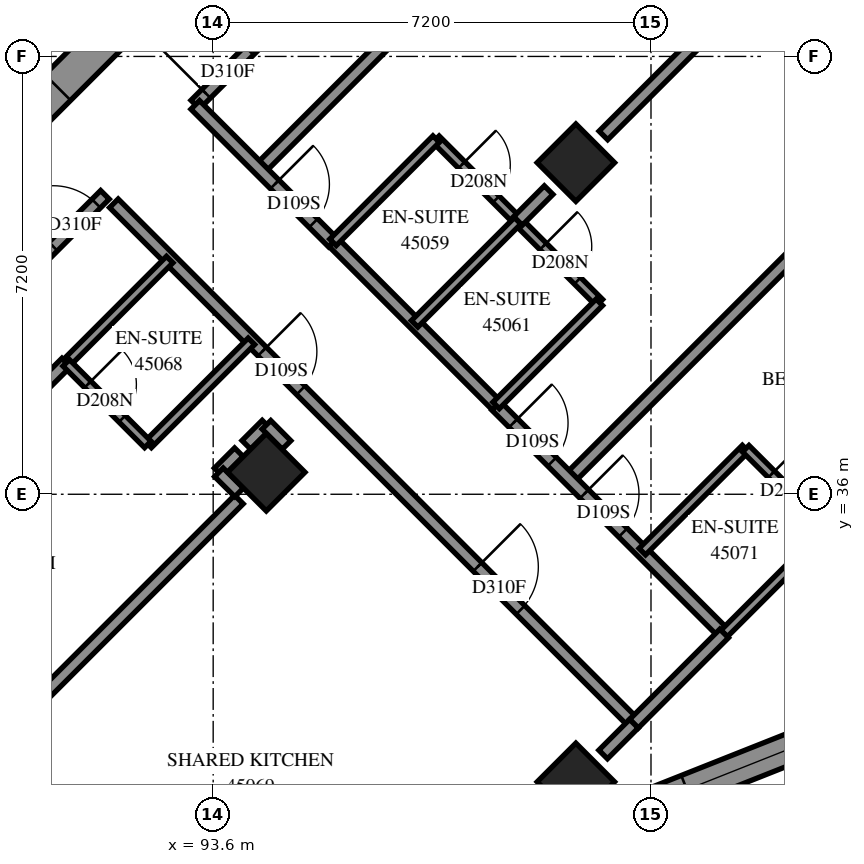
"""IFC4 building model, lengths in metres.
Left out: names, types, materials, properties, quantities, classifications, styles, units other than length and angle.
Written with IfcOpenShell. Run it as: python <this file> out.ifc"""

import sys

from ifc_helpers import new_model, si_unit, direction, frame, frame_2d, origin, origin_2d, place, context, subcontext, project, spatial, polyline, rectangle, outline, extrude, element, fill, save


model = new_model("IFC4")
c1 = context("Model", 3, precision=1e-05, world=origin(), true_north=direction((0.0, 1.0)))
c2 = subcontext(c1, "Body", "Model", "MODEL_VIEW")
j1 = project(units=[si_unit("LENGTHUNIT", "METRE"), si_unit("PLANEANGLEUNIT", "RADIAN")], contexts=[c1])
p1 = place(None, origin())
s1 = spatial("IfcSite", under=j1, at=p1, CompositionType="ELEMENT")
p2 = place(p1, origin())
s2 = spatial("IfcBuilding", under=s1, at=p2, CompositionType="ELEMENT")
p3 = place(p2, frame((0.0, 0.0, 166.0)))
s3 = spatial("IfcBuildingStorey", under=s2, at=p3, CompositionType="ELEMENT", Elevation=166.0)
for number, where, z_axis, x_axis in (
    (1, (99.565, 41.453, 0.0), (0.0, 0.0, 1.0), (0.707, -0.707, 0.0)),
    (2, (94.474, 36.362, 0.0), (0.0, 0.0, 1.0), (0.707, -0.707, 0.0)),
    (3, (99.565, 31.271, 0.0), (0.0, 0.0, 1.0), (0.707, -0.707, 0.0)),
):
    element("IfcColumn", number, at=place(p3, frame(where, z_axis=z_axis, x_axis=x_axis)), inside=s3, PredefinedType="COLUMN", context=c2, shape_type="SweptSolid", body=[
        extrude(rectangle(XDim=0.9, YDim=0.9, at=origin_2d()), origin(), (0.0, 0.0, 1.0), 3.1),
    ])
p4 = place(p3, frame((87.049, 38.695, -0.3), z_axis=(0.0, 0.0, 1.0), x_axis=(0.7071067812, 0.7071067812, 0.0)))
e4 = element("IfcWall", 4, at=p4, inside=s3, PredefinedType="SHEAR", context=c2, shape_type="SweptSolid", body=[
    extrude(rectangle(XDim=14.4, YDim=0.6, at=frame_2d((7.2, 0.0))), origin(), (0.0, 0.0, 1.0), 2.7),
])
p5 = place(p4, frame((4.55, 0.0, 0.3)))
e5 = element("IfcOpeningElement", 5, at=p5, cuts=e4, PredefinedType="OPENING", context=c2, shape_type="SweptSolid", body=[
    extrude(rectangle(XDim=1.1, YDim=2.1, at=frame_2d((0.55, 1.05))), frame((0.0, 0.31, 0.0), z_axis=(0.0, -1.0, 0.0), x_axis=(1.0, 0.0, 0.0)), (0.0, 0.0, 1.0), 0.62),
])
p6 = place(p4, frame((11.35, 0.0, 0.3)))
e6 = element("IfcOpeningElement", 6, at=p6, cuts=e4, PredefinedType="OPENING", context=c2, shape_type="SweptSolid", body=[
    extrude(rectangle(XDim=1.1, YDim=2.1, at=frame_2d((0.55, 1.05))), frame((0.0, 0.31, 0.0), z_axis=(0.0, -1.0, 0.0), x_axis=(1.0, 0.0, 0.0)), (0.0, 0.0, 1.0), 0.62),
])
p7 = place(p3, frame((100.796, 30.907, 0.0), z_axis=(0.0, 0.0, 1.0), x_axis=(0.9295366495, 0.3687297347, 0.0)))
e7 = element("IfcWall", 7, at=p7, inside=s3, PredefinedType="SOLIDWALL", context=c2, shape_type="SweptSolid", body=[
    extrude(outline(polyline([(0.108, -0.25), (5.656, -0.25), (5.43, 0.25), (-0.108, 0.25), (0.108, -0.25)])), origin(), (0.0, 0.0, 1.0), 3.1),
])
p8 = place(p7, frame((0.638, 0.0, 0.45)))
e8 = element("IfcOpeningElement", 8, at=p8, cuts=e7, PredefinedType="OPENING", context=c2, shape_type="SweptSolid", body=[
    extrude(rectangle(XDim=2.8, YDim=2.5, at=frame_2d((1.4, 1.25))), frame((0.0, 0.26, 0.0), z_axis=(0.0, -1.0, 0.0), x_axis=(1.0, 0.0, 0.0)), (0.0, 0.0, 1.0), 0.52),
])
p9 = place(p3, frame((91.967, 40.785, 0.0), z_axis=(0.0, 0.0, 1.0), x_axis=(0.7071067812, -0.7071067812, 0.0)))
e9 = element("IfcWall", 9, at=p9, inside=s3, PredefinedType="PARTITIONING", context=c2, shape_type="SweptSolid", body=[
    extrude(rectangle(XDim=12.1, YDim=0.2, at=frame_2d((6.05, 0.0))), origin(), (0.0, 0.0, 1.0), 3.1),
])
p10 = place(p9, frame((3.448, 0.0, 0.0)))
e10 = element("IfcOpeningElement", 10, at=p10, cuts=e9, PredefinedType="OPENING", context=c2, shape_type="SweptSolid", body=[
    extrude(rectangle(XDim=0.9, YDim=2.1, at=frame_2d((0.45, 1.05))), frame((0.0, 0.11, 0.0), z_axis=(0.0, -1.0, 0.0), x_axis=(1.0, 0.0, 0.0)), (0.0, 0.0, 1.0), 0.22),
])
p11 = place(p9, frame((8.457, 0.0, 0.0)))
e11 = element("IfcOpeningElement", 11, at=p11, cuts=e9, PredefinedType="OPENING", context=c2, shape_type="SweptSolid", body=[
    extrude(rectangle(XDim=1.0, YDim=2.1, at=frame_2d((0.5, 1.05))), frame((0.0, 0.11, 0.0), z_axis=(0.0, -1.0, 0.0), x_axis=(1.0, 0.0, 0.0)), (0.0, 0.0, 1.0), 0.22),
])
p12 = place(p3, frame((94.366, 41.348, 0.0), z_axis=(0.0, 0.0, 1.0), x_axis=(0.7071108994, 0.707102663, 0.0)))
e12 = element("IfcWall", 12, at=p12, inside=s3, PredefinedType="PARTITIONING", context=c2, shape_type="SweptSolid", body=[
    extrude(rectangle(XDim=12.141, YDim=0.2, at=frame_2d((6.071, 0.0))), origin(), (0.0, 0.0, 1.0), 3.1),
])
p13 = place(p3, frame((93.306, 42.408, 0.0), z_axis=(0.0, 0.0, 1.0), x_axis=(0.7071067812, 0.7071067812, 0.0)))
e13 = element("IfcWall", 13, at=p13, inside=s3, PredefinedType="PARTITIONING", context=c2, shape_type="SweptSolid", body=[
    extrude(rectangle(XDim=9.45, YDim=0.2, at=frame_2d((4.725, 0.0))), origin(), (0.0, 0.0, 1.0), 3.1),
])
p14 = place(p13, frame((0.253, 0.0, 0.0)))
e14 = element("IfcOpeningElement", 14, at=p14, cuts=e13, PredefinedType="OPENING", context=c2, shape_type="SweptSolid", body=[
    extrude(rectangle(XDim=1.0, YDim=2.1, at=frame_2d((0.5, 1.05))), frame((0.0, 0.11, 0.0), z_axis=(0.0, -1.0, 0.0), x_axis=(1.0, 0.0, 0.0)), (0.0, 0.0, 1.0), 0.22),
])
p15 = place(p3, frame((86.834, 35.94, 0.0), z_axis=(0.0, 0.0, 1.0), x_axis=(0.7072486139, 0.7069649201, 0.0)))
e15 = element("IfcWall", 15, at=p15, inside=s3, PredefinedType="PARTITIONING", context=c2, shape_type="SweptSolid", body=[
    extrude(rectangle(XDim=7.05, YDim=0.2, at=frame_2d((3.525, 0.0))), origin(), (0.0, 0.0, 1.0), 3.1),
])
p16 = place(p15, frame((5.848, 0.0, 0.0)))
e16 = element("IfcOpeningElement", 16, at=p16, cuts=e15, PredefinedType="OPENING", context=c2, shape_type="SweptSolid", body=[
    extrude(rectangle(XDim=1.0, YDim=2.1, at=frame_2d((0.5, 1.05))), frame((0.0, 0.11, 0.0), z_axis=(0.0, -1.0, 0.0), x_axis=(1.0, 0.0, 0.0)), (0.0, 0.0, 1.0), 0.22),
])
p17 = place(p3, frame((86.329, 33.313, 0.0), z_axis=(0.0, 0.0, 1.0), x_axis=(0.7072524412, 0.7069610911, 0.0)))
e17 = element("IfcWall", 17, at=p17, inside=s3, PredefinedType="PARTITIONING", context=c2, shape_type="SweptSolid", body=[
    extrude(rectangle(XDim=6.865, YDim=0.2, at=frame_2d((3.432, 0.0))), origin(), (0.0, 0.0, 1.0), 3.1),
])
p18 = place(p3, frame((99.458, 36.256, 0.0), z_axis=(0.0, 0.0, 1.0), x_axis=(0.7071067812, 0.7071067812, 0.0)))
e18 = element("IfcWall", 18, at=p18, inside=s3, PredefinedType="PARTITIONING", context=c2, shape_type="SweptSolid", body=[
    extrude(rectangle(XDim=6.85, YDim=0.2, at=frame_2d((3.425, 0.0))), origin(), (0.0, 0.0, 1.0), 3.1),
])
p19 = place(p3, frame((89.831, 31.721, 0.0), z_axis=(0.0, 0.0, 1.0), x_axis=(0.7071067812, 0.7071067812, 0.0)))
e19 = element("IfcWall", 19, at=p19, inside=s3, PredefinedType="PARTITIONING", context=c2, shape_type="SweptSolid", body=[
    extrude(rectangle(XDim=5.928, YDim=0.2, at=frame_2d((2.964, 0.0))), origin(), (0.0, 0.0, 1.0), 3.1),
])
p20 = place(p3, frame((100.017, 41.901, 0.0), z_axis=(0.0, 0.0, 1.0), x_axis=(0.7072754814, 0.7069380408, 0.0)))
e20 = element("IfcWall", 20, at=p20, inside=s3, PredefinedType="PARTITIONING", context=c2, shape_type="SweptSolid", body=[
    extrude(rectangle(XDim=5.927, YDim=0.2, at=frame_2d((2.963, 0.0))), origin(), (0.0, 0.0, 1.0), 3.1),
])
p21 = place(p3, frame((98.253, 37.455, 0.0), z_axis=(0.0, 0.0, 1.0), x_axis=(0.7071067812, -0.7071067812, 0.0)))
e21 = element("IfcWall", 21, at=p21, inside=s3, PredefinedType="PARTITIONING", context=c2, shape_type="SweptSolid", body=[
    extrude(rectangle(XDim=5.301, YDim=0.2, at=frame_2d((2.65, 0.0))), origin(), (0.0, 0.0, 1.0), 3.1),
])
p22 = place(p21, frame((0.401, 0.0, 0.0)))
e22 = element("IfcOpeningElement", 22, at=p22, cuts=e21, PredefinedType="OPENING", context=c2, shape_type="SweptSolid", body=[
    extrude(rectangle(XDim=0.9, YDim=2.1, at=frame_2d((0.45, 1.05))), frame((0.0, 0.11, 0.0), z_axis=(0.0, -1.0, 0.0), x_axis=(1.0, 0.0, 0.0)), (0.0, 0.0, 1.0), 0.22),
])
p23 = place(p21, frame((2.05, 0.0, 0.0)))
e23 = element("IfcOpeningElement", 23, at=p23, cuts=e21, PredefinedType="OPENING", context=c2, shape_type="SweptSolid", body=[
    extrude(rectangle(XDim=0.9, YDim=2.1, at=frame_2d((0.45, 1.05))), frame((0.0, 0.11, 0.0), z_axis=(0.0, -1.0, 0.0), x_axis=(1.0, 0.0, 0.0)), (0.0, 0.0, 1.0), 0.22),
])
p24 = place(p3, frame((97.263, 41.839, 0.0), z_axis=(0.0, 0.0, 1.0), x_axis=(0.7071067812, -0.7071067812, 0.0)))
e24 = element("IfcWall", 24, at=p24, inside=s3, PredefinedType="PARTITIONING", context=c2, shape_type="SweptSolid", body=[
    extrude(rectangle(XDim=3.801, YDim=0.15, at=frame_2d((1.901, 0.0))), origin(), (0.0, 0.0, 1.0), 3.1),
])
p25 = place(p24, frame((0.598, 0.0, 0.0)))
e25 = element("IfcOpeningElement", 25, at=p25, cuts=e24, PredefinedType="OPENING", context=c2, shape_type="SweptSolid", body=[
    extrude(rectangle(XDim=0.8, YDim=2.1, at=frame_2d((0.4, 1.05))), frame((0.0, 0.085, 0.0), z_axis=(0.0, -1.0, 0.0), x_axis=(1.0, 0.0, 0.0)), (0.0, 0.0, 1.0), 0.17),
])
p26 = place(p24, frame((2.493, 0.0, 0.0)))
e26 = element("IfcOpeningElement", 26, at=p26, cuts=e24, PredefinedType="OPENING", context=c2, shape_type="SweptSolid", body=[
    extrude(rectangle(XDim=0.8, YDim=2.1, at=frame_2d((0.4, 1.05))), frame((0.0, 0.085, 0.0), z_axis=(0.0, -1.0, 0.0), x_axis=(1.0, 0.0, 0.0)), (0.0, 0.0, 1.0), 0.17),
])
p27 = place(p3, frame((95.573, 40.148, 0.0), z_axis=(0.0, 0.0, 1.0), x_axis=(0.7068698107, -0.7073436723, 0.0)))
e27 = element("IfcWall", 27, at=p27, inside=s3, PredefinedType="PARTITIONING", context=c2, shape_type="SweptSolid", body=[
    extrude(rectangle(XDim=3.799, YDim=0.2, at=frame_2d((1.899, 0.0))), origin(), (0.0, 0.0, 1.0), 3.1),
])
p28 = place(p3, frame((93.305, 42.403, 0.0), z_axis=(0.0, 0.0, 1.0), x_axis=(0.7071067812, -0.7071067812, 0.0)))
e28 = element("IfcWall", 28, at=p28, inside=s3, PredefinedType="PARTITIONING", context=c2, shape_type="SweptSolid", body=[
    extrude(rectangle(XDim=3.199, YDim=0.2, at=frame_2d((1.599, 0.0))), origin(), (0.0, 0.0, 1.0), 3.1),
])
p29 = place(p28, frame((1.848, 0.0, 0.0)))
e29 = element("IfcOpeningElement", 29, at=p29, cuts=e28, PredefinedType="OPENING", context=c2, shape_type="SweptSolid", body=[
    extrude(rectangle(XDim=0.9, YDim=2.1, at=frame_2d((0.45, 1.05))), frame((0.0, 0.11, 0.0), z_axis=(0.0, -1.0, 0.0), x_axis=(1.0, 0.0, 0.0)), (0.0, 0.0, 1.0), 0.22),
])
p30 = place(p3, frame((102.003, 33.711, 0.0), z_axis=(0.0, 0.0, 1.0), x_axis=(0.7071067812, 0.7071067812, 0.0)))
e30 = element("IfcWall", 30, at=p30, inside=s3, PredefinedType="PARTITIONING", context=c2, shape_type="SweptSolid", body=[
    extrude(rectangle(XDim=2.401, YDim=0.15, at=frame_2d((1.201, 0.0))), origin(), (0.0, 0.0, 1.0), 2.6),
])
for number, where, z_axis, x_axis in (
    (31, (95.571, 40.143, 0.0), (0.0, 0.0, 1.0), (0.707, 0.708, 0.0)),
    (32, (98.253, 37.461, 0.0), (0.0, 0.0, 1.0), (0.708, 0.707, 0.0)),
    (33, (100.657, 35.057, 0.0), (0.0, 0.0, 1.0), (0.708, 0.707, 0.0)),
    (34, (91.189, 38.161, 0.0), (0.0, 0.0, 1.0), (0.707, 0.708, 0.0)),
    (35, (92.531, 36.819, 0.0), (0.0, 0.0, 1.0), (0.708, 0.707, 0.0)),
):
    element("IfcWall", number, at=place(p3, frame(where, z_axis=z_axis, x_axis=x_axis)), inside=s3, PredefinedType="PARTITIONING", context=c2, shape_type="SweptSolid", body=[
        extrude(rectangle(XDim=2.4, YDim=0.15, at=frame_2d((1.2, 0.0))), origin(), (0.0, 0.0, 1.0), 3.1),
    ])
p31 = place(p3, frame((96.913, 38.803, 0.0), z_axis=(0.0, 0.0, 1.0), x_axis=(0.7071067812, 0.7071067812, 0.0)))
e36 = element("IfcWall", 36, at=p31, inside=s3, PredefinedType="PARTITIONING", context=c2, shape_type="SweptSolid", body=[
    extrude(rectangle(XDim=2.398, YDim=0.15, at=frame_2d((1.199, 0.0))), origin(), (0.0, 0.0, 1.0), 3.1),
])
p32 = place(p3, frame((100.519, 32.227, 0.0), z_axis=(0.0, 0.0, 1.0), x_axis=(0.7071067812, 0.7071067812, 0.0)))
e37 = element("IfcWall", 37, at=p32, inside=s3, PredefinedType="PARTITIONING", context=c2, shape_type="SweptSolid", body=[
    extrude(rectangle(XDim=2.099, YDim=0.2, at=frame_2d((1.049, 0.0))), origin(), (0.0, 0.0, 1.0), 2.6),
])
p33 = place(p3, frame((102.358, 36.75, 0.0), z_axis=(0.0, 0.0, 1.0), x_axis=(0.7076330979, -0.7065800724, 0.0)))
e38 = element("IfcWall", 38, at=p33, inside=s3, PredefinedType="PARTITIONING", context=c2, shape_type="SweptSolid", body=[
    extrude(rectangle(XDim=1.899, YDim=0.15, at=frame_2d((0.95, 0.0))), origin(), (0.0, 0.0, 1.0), 3.1),
])
p34 = place(p33, frame((0.597, 0.0, 0.0)))
e39 = element("IfcOpeningElement", 39, at=p34, cuts=e38, PredefinedType="OPENING", context=c2, shape_type="SweptSolid", body=[
    extrude(rectangle(XDim=0.8, YDim=2.1, at=frame_2d((0.4, 1.05))), frame((0.0, 0.085, 0.0), z_axis=(0.0, -1.0, 0.0), x_axis=(1.0, 0.0, 0.0)), (0.0, 0.0, 1.0), 0.17),
])
p35 = place(p3, frame((91.183, 38.161, 0.0), z_axis=(0.0, 0.0, 1.0), x_axis=(0.7071067812, -0.7071067812, 0.0)))
e40 = element("IfcWall", 40, at=p35, inside=s3, PredefinedType="PARTITIONING", context=c2, shape_type="SweptSolid", body=[
    extrude(rectangle(XDim=1.898, YDim=0.15, at=frame_2d((0.949, 0.0))), origin(), (0.0, 0.0, 1.0), 3.1),
])
p36 = place(p35, frame((0.501, 0.0, 0.0)))
e41 = element("IfcOpeningElement", 41, at=p36, cuts=e40, PredefinedType="OPENING", context=c2, shape_type="SweptSolid", body=[
    extrude(rectangle(XDim=0.8, YDim=2.1, at=frame_2d((0.4, 1.05))), frame((0.0, 0.085, 0.0), z_axis=(0.0, -1.0, 0.0), x_axis=(1.0, 0.0, 0.0)), (0.0, 0.0, 1.0), 0.17),
])
p37 = place(p3, frame((100.013, 31.721, 0.0), z_axis=(0.0, 0.0, 1.0), x_axis=(0.7071067812, 0.7071067812, 0.0)))
e42 = element("IfcWall", 42, at=p37, inside=s3, PredefinedType="PARTITIONING", context=c2, shape_type="SweptSolid", body=[
    extrude(rectangle(XDim=0.716, YDim=0.2, at=frame_2d((0.358, 0.0))), origin(), (0.0, 0.0, 1.0), 2.6),
])
p38 = place(p3, frame((98.613, 40.495, 0.0), z_axis=(0.0, 0.0, 1.0), x_axis=(0.7057051861, 0.7085056035, 0.0)))
e43 = element("IfcWall", 43, at=p38, inside=s3, PredefinedType="PARTITIONING", context=c2, shape_type="SweptSolid", body=[
    extrude(rectangle(XDim=0.714, YDim=0.2, at=frame_2d((0.357, 0.0))), origin(), (0.0, 0.0, 1.0), 3.1),
])
for number, where, z_axis, x_axis in (
    (44, (94.145, 36.813, 0.0), (0.0, 0.0, 1.0), (0.707, 0.707, 0.0)),
    (45, (93.691, 36.359, 0.0), (0.0, 0.0, 1.0), (0.707, 0.707, 0.0)),
):
    element("IfcWall", number, at=place(p3, frame(where, z_axis=z_axis, x_axis=x_axis)), inside=s3, PredefinedType="PARTITIONING", context=c2, shape_type="SweptSolid", body=[
        extrude(rectangle(XDim=0.469, YDim=0.2, at=frame_2d((0.235, 0.0))), origin(), (0.0, 0.0, 1.0), 3.1),
    ])
for number, where, z_axis, x_axis in (
    (46, (94.476, 37.142, 0.0), (0.0, 0.0, 1.0), (0.705, -0.709, 0.0)),
    (47, (93.695, 36.361, 0.0), (0.0, 0.0, 1.0), (0.709, -0.705, 0.0)),
):
    element("IfcWall", number, at=place(p3, frame(where, z_axis=z_axis, x_axis=x_axis)), inside=s3, PredefinedType="PARTITIONING", context=c2, shape_type="SweptSolid", body=[
        extrude(rectangle(XDim=0.468, YDim=0.2, at=frame_2d((0.234, 0.0))), origin(), (0.0, 0.0, 1.0), 3.1),
    ])
p39 = place(p8, origin())
e48 = element("IfcWindow", 48, at=p39, inside=s3, PartitioningType="SINGLE_PANEL", PredefinedType="WINDOW", context=c2, shape_type="SweptSolid", body=[
    extrude(rectangle(XDim=2.8, YDim=2.5, at=frame_2d((1.4, 1.25))), frame((0.0, 0.18, 0.0), z_axis=(0.0, -1.0, 0.0), x_axis=(1.0, 0.0, 0.0)), (0.0, 0.0, 1.0), 0.06),
])
fill(e8, e48)
p40 = place(p5, origin())
e49 = element("IfcDoor", 49, at=p40, inside=s3, OperationType="DOUBLE_DOOR_SINGLE_SWING", PredefinedType="DOOR", context=c2, shape_type="SweptSolid", body=[
    extrude(rectangle(XDim=1.1, YDim=2.1, at=frame_2d((0.55, 1.05))), frame((0.0, 0.025, 0.0), z_axis=(0.0, -1.0, 0.0), x_axis=(1.0, 0.0, 0.0)), (0.0, 0.0, 1.0), 0.05),
])
fill(e5, e49)
p41 = place(p14, origin())
e50 = element("IfcDoor", 50, at=p41, inside=s3, OperationType="SINGLE_SWING_RIGHT", PredefinedType="DOOR", context=c2, shape_type="SweptSolid", body=[
    extrude(rectangle(XDim=1.0, YDim=2.1, at=frame_2d((0.5, 1.05))), frame((0.0, 0.025, 0.0), z_axis=(0.0, -1.0, 0.0), x_axis=(1.0, 0.0, 0.0)), (0.0, 0.0, 1.0), 0.05),
])
fill(e14, e50)
p42 = place(p29, origin())
e51 = element("IfcDoor", 51, at=p42, inside=s3, OperationType="SINGLE_SWING_RIGHT", PredefinedType="DOOR", context=c2, shape_type="SweptSolid", body=[
    extrude(rectangle(XDim=0.9, YDim=2.1, at=frame_2d((0.45, 1.05))), frame((0.0, 0.025, 0.0), z_axis=(0.0, -1.0, 0.0), x_axis=(1.0, 0.0, 0.0)), (0.0, 0.0, 1.0), 0.05),
])
fill(e29, e51)
p43 = place(p25, origin())
e52 = element("IfcDoor", 52, at=p43, inside=s3, OperationType="SINGLE_SWING_RIGHT", PredefinedType="DOOR", context=c2, shape_type="SweptSolid", body=[
    extrude(rectangle(XDim=0.8, YDim=2.1, at=frame_2d((0.4, 1.05))), frame((0.0, 0.025, 0.0), z_axis=(0.0, -1.0, 0.0), x_axis=(1.0, 0.0, 0.0)), (0.0, 0.0, 1.0), 0.05),
])
fill(e25, e52)
p44 = place(p22, origin())
e53 = element("IfcDoor", 53, at=p44, inside=s3, OperationType="SINGLE_SWING_LEFT", PredefinedType="DOOR", context=c2, shape_type="SweptSolid", body=[
    extrude(rectangle(XDim=0.9, YDim=2.1, at=frame_2d((0.45, 1.05))), frame((0.0, 0.025, 0.0), z_axis=(0.0, -1.0, 0.0), x_axis=(1.0, 0.0, 0.0)), (0.0, 0.0, 1.0), 0.05),
])
fill(e22, e53)
p45 = place(p26, origin())
e54 = element("IfcDoor", 54, at=p45, inside=s3, OperationType="SINGLE_SWING_RIGHT", PredefinedType="DOOR", context=c2, shape_type="SweptSolid", body=[
    extrude(rectangle(XDim=0.8, YDim=2.1, at=frame_2d((0.4, 1.05))), frame((0.0, 0.025, 0.0), z_axis=(0.0, -1.0, 0.0), x_axis=(1.0, 0.0, 0.0)), (0.0, 0.0, 1.0), 0.05),
])
fill(e26, e54)
p46 = place(p16, origin())
e55 = element("IfcDoor", 55, at=p46, inside=s3, OperationType="SINGLE_SWING_RIGHT", PredefinedType="DOOR", context=c2, shape_type="SweptSolid", body=[
    extrude(rectangle(XDim=1.0, YDim=2.1, at=frame_2d((0.5, 1.05))), frame((0.0, 0.025, 0.0), z_axis=(0.0, -1.0, 0.0), x_axis=(1.0, 0.0, 0.0)), (0.0, 0.0, 1.0), 0.05),
])
fill(e16, e55)
p47 = place(p10, origin())
e56 = element("IfcDoor", 56, at=p47, inside=s3, OperationType="SINGLE_SWING_LEFT", PredefinedType="DOOR", context=c2, shape_type="SweptSolid", body=[
    extrude(rectangle(XDim=0.9, YDim=2.1, at=frame_2d((0.45, 1.05))), frame((0.0, 0.025, 0.0), z_axis=(0.0, -1.0, 0.0), x_axis=(1.0, 0.0, 0.0)), (0.0, 0.0, 1.0), 0.05),
])
fill(e10, e56)
p48 = place(p36, origin())
e57 = element("IfcDoor", 57, at=p48, inside=s3, OperationType="SINGLE_SWING_RIGHT", PredefinedType="DOOR", context=c2, shape_type="SweptSolid", body=[
    extrude(rectangle(XDim=0.8, YDim=2.1, at=frame_2d((0.4, 1.05))), frame((0.0, 0.025, 0.0), z_axis=(0.0, -1.0, 0.0), x_axis=(1.0, 0.0, 0.0)), (0.0, 0.0, 1.0), 0.05),
])
fill(e41, e57)
p49 = place(p11, origin())
e58 = element("IfcDoor", 58, at=p49, inside=s3, OperationType="SINGLE_SWING_RIGHT", PredefinedType="DOOR", context=c2, shape_type="SweptSolid", body=[
    extrude(rectangle(XDim=1.0, YDim=2.1, at=frame_2d((0.5, 1.05))), frame((0.0, 0.025, 0.0), z_axis=(0.0, -1.0, 0.0), x_axis=(1.0, 0.0, 0.0)), (0.0, 0.0, 1.0), 0.05),
])
fill(e11, e58)
p50 = place(p23, origin())
e59 = element("IfcDoor", 59, at=p50, inside=s3, OperationType="SINGLE_SWING_RIGHT", PredefinedType="DOOR", context=c2, shape_type="SweptSolid", body=[
    extrude(rectangle(XDim=0.9, YDim=2.1, at=frame_2d((0.45, 1.05))), frame((0.0, 0.025, 0.0), z_axis=(0.0, -1.0, 0.0), x_axis=(1.0, 0.0, 0.0)), (0.0, 0.0, 1.0), 0.05),
])
fill(e23, e59)
p51 = place(p34, origin())
e60 = element("IfcDoor", 60, at=p51, inside=s3, OperationType="SINGLE_SWING_RIGHT", PredefinedType="DOOR", context=c2, shape_type="SweptSolid", body=[
    extrude(rectangle(XDim=0.8, YDim=2.1, at=frame_2d((0.4, 1.05))), frame((0.0, 0.025, 0.0), z_axis=(0.0, -1.0, 0.0), x_axis=(1.0, 0.0, 0.0)), (0.0, 0.0, 1.0), 0.05),
])
fill(e39, e60)
save(model, sys.argv[1])
